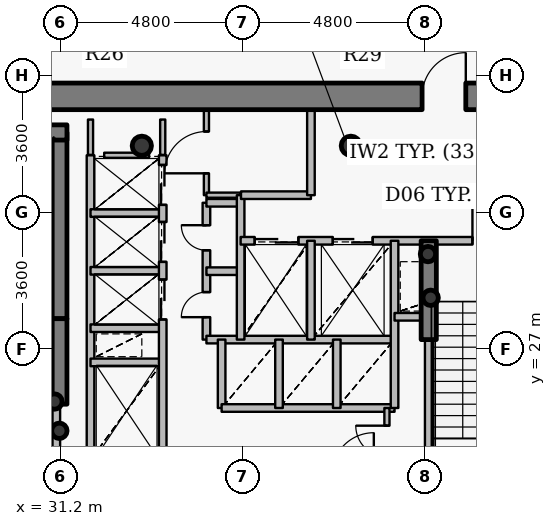
"""IFC4 building model, lengths in metres.
Left out: names, types, materials, properties, quantities, classifications, styles, units other than length and angle.
Written with IfcOpenShell. Run it as: python <this file> out.ifc"""

import sys

from ifc_helpers import new_model, si_unit, direction, frame, frame_2d, origin, origin_2d, place, context, subcontext, project, spatial, rectangle, hollow_circle, extrude, source, transform, mapped, element, fill, save


model = new_model("IFC4")
c1 = context("Model", 3, precision=1e-05, world=origin(), true_north=direction((0.0, 1.0)))
c2 = subcontext(c1, "Body", "Model", "MODEL_VIEW")
j1 = project(units=[si_unit("LENGTHUNIT", "METRE"), si_unit("PLANEANGLEUNIT", "RADIAN")], contexts=[c1])
p1 = place(None, origin())
s1 = spatial("IfcSite", under=j1, at=p1, CompositionType="ELEMENT")
p2 = place(p1, origin())
s2 = spatial("IfcBuilding", under=s1, at=p2, CompositionType="ELEMENT")
p3 = place(p2, frame((0.0, 0.0, 214.05)))
s3 = spatial("IfcBuildingStorey", under=s2, at=p3, CompositionType="ELEMENT", Elevation=214.05)
for number, where, z_axis, x_axis in (
    (1, (38.85, 32.35, 0.0), (0.0, 0.0, 1.0), (1.0, 0.0, 0.0)),
    (2, (33.35, 32.35, 0.0), (0.0, 0.0, 1.0), (1.0, 0.0, 0.0)),
):
    element("IfcColumn", number, at=place(p3, frame(where, z_axis=z_axis, x_axis=x_axis)), inside=s3, PredefinedType="COLUMN", context=c2, shape_type="SweptSolid", body=[
        extrude(hollow_circle(Radius=0.254, WallThickness=0.02, at=origin_2d()), origin(), (0.0, 0.0, 1.0), 3.75),
    ])
p4 = place(p3, frame((31.18, 27.8, 0.0), z_axis=(0.0, 0.0, 1.0), x_axis=(0.0, 1.0, 0.0)))
e3 = element("IfcWall", 3, at=p4, inside=s3, PredefinedType="SHEAR", context=c2, shape_type="SweptSolid", body=[
    extrude(rectangle(XDim=4.9, YDim=0.4, at=frame_2d((2.45, 0.0))), origin(), (0.0, 0.0, 1.0), 3.75),
])
p5 = place(p3, frame((27.28, 32.7, 0.0), z_axis=(0.0, 0.0, 1.0), x_axis=(1.0, 0.0, 0.0)))
e4 = element("IfcWall", 4, at=p5, inside=s3, PredefinedType="SHEAR", context=c2, shape_type="SweptSolid", body=[
    extrude(rectangle(XDim=4.1, YDim=0.4, at=frame_2d((2.05, 0.0))), origin(), (0.0, 0.0, 1.0), 3.75),
])
for number, where, z_axis, x_axis in (
    (5, (31.05, 25.62, 0.0), (0.0, 0.0, 1.0), (1.0, 0.0, 0.0)),
    (6, (31.18, 24.85, 0.0), (0.0, 0.0, 1.0), (1.0, 0.0, 0.0)),
    (7, (40.95, 28.35, 0.0), (0.0, 0.0, 1.0), (1.0, 0.0, 0.0)),
    (8, (40.88, 29.5, 0.0), (0.0, 0.0, 1.0), (1.0, 0.0, 0.0)),
):
    element("IfcColumn", number, at=place(p3, frame(where, z_axis=z_axis, x_axis=x_axis)), inside=s3, PredefinedType="COLUMN", context=c2, shape_type="SweptSolid", body=[
        extrude(hollow_circle(Radius=0.203, WallThickness=0.016, at=origin_2d()), origin(), (0.0, 0.0, 1.0), 3.75),
    ])
p6 = place(p3, frame((27.05, 33.65, 0.0), z_axis=(0.0, 0.0, 1.0), x_axis=(1.0, 0.0, 0.0)))
e9 = element("IfcWall", 9, at=p6, inside=s3, PredefinedType="SHEAR", context=c2, shape_type="SweptSolid", body=[
    extrude(rectangle(XDim=17.9, YDim=0.7, at=frame_2d((8.95, 0.0))), origin(), (0.0, 0.0, 1.0), 3.05),
])
p7 = place(p6, frame((13.675, 0.0, 0.0)))
e10 = element("IfcOpeningElement", 10, at=p7, cuts=e9, PredefinedType="OPENING", context=c2, shape_type="SweptSolid", body=[
    extrude(rectangle(XDim=1.15, YDim=2.15, at=origin_2d()), frame((0.575, 0.36, 1.075), z_axis=(0.0, -1.0, 0.0), x_axis=(1.0, 0.0, 0.0)), (0.0, 0.0, 1.0), 0.72),
])
p8 = place(p3, frame((31.18, 25.55, 0.0), z_axis=(0.0, 0.0, 1.0), x_axis=(0.0, 1.0, 0.0)))
e11 = element("IfcWall", 11, at=p8, inside=s3, PredefinedType="SHEAR", context=c2, shape_type="SweptSolid", body=[
    extrude(rectangle(XDim=2.25, YDim=0.4, at=frame_2d((1.125, 0.0))), origin(), (0.0, 0.0, 1.0), 3.1),
])
p9 = place(p3, frame((40.9, 27.25, 0.0), z_axis=(0.0, 0.0, 1.0), x_axis=(0.0, 1.0, 0.0)))
e12 = element("IfcWall", 12, at=p9, inside=s3, PredefinedType="SHEAR", context=c2, shape_type="SweptSolid", body=[
    extrude(rectangle(XDim=2.6, YDim=0.4, at=frame_2d((1.3, 0.0))), origin(), (0.0, 0.0, 1.0), 3.1),
])
p10 = place(p3, frame((31.1, 24.1, 0.0), z_axis=(0.0, 0.0, 1.0), x_axis=(0.0, 1.0, 0.0)))
e13 = element("IfcWall", 13, at=p10, inside=s3, PredefinedType="PARTITIONING", context=c2, shape_type="SweptSolid", body=[
    extrude(rectangle(XDim=1.44, YDim=0.2, at=frame_2d((0.72, 0.0))), origin(), (0.0, 0.0, 1.0), 3.5),
])
p11 = place(p3, frame((32.0, 24.1, 0.0), z_axis=(0.0, 0.0, 1.0), x_axis=(0.0, 1.0, 0.0)))
e14 = element("IfcWall", 14, at=p11, inside=s3, PredefinedType="PARTITIONING", context=c2, shape_type="SweptSolid", body=[
    extrude(rectangle(XDim=8.0, YDim=0.2, at=frame_2d((4.0, 0.0))), origin(), (0.0, 0.0, 1.0), 3.5),
])
for number, where, z_axis, x_axis in (
    (15, (32.0, 26.65, 0.0), (0.0, 0.0, 1.0), (1.0, 0.0, 0.0)),
    (16, (32.0, 27.55, 0.0), (0.0, 0.0, 1.0), (1.0, 0.0, 0.0)),
    (17, (32.0, 29.06, 0.0), (0.0, 0.0, 1.0), (1.0, 0.0, 0.0)),
    (18, (32.0, 30.58, 0.0), (0.0, 0.0, 1.0), (1.0, 0.0, 0.0)),
):
    element("IfcWall", number, at=place(p3, frame(where, z_axis=z_axis, x_axis=x_axis)), inside=s3, PredefinedType="PARTITIONING", context=c2, shape_type="SweptSolid", body=[
        extrude(rectangle(XDim=1.9, YDim=0.2, at=frame_2d((0.95, 0.0))), origin(), (0.0, 0.0, 1.0), 3.085),
    ])
p12 = place(p3, frame((33.9, 20.7, 0.0), z_axis=(0.0, 0.0, 1.0), x_axis=(0.0, 1.0, 0.0)))
e19 = element("IfcWall", 19, at=p12, inside=s3, PredefinedType="PARTITIONING", context=c2, shape_type="SweptSolid", body=[
    extrude(rectangle(XDim=11.4, YDim=0.2, at=frame_2d((5.7, 0.0))), origin(), (0.0, 0.0, 1.0), 3.085),
])
p13 = place(p12, frame((7.08, 0.0, 0.0)))
e20 = element("IfcOpeningElement", 20, at=p13, cuts=e19, PredefinedType="OPENING", context=c2, shape_type="SweptSolid", body=[
    extrude(rectangle(XDim=1.05, YDim=2.15, at=origin_2d()), frame((0.525, 0.11, 1.075), z_axis=(0.0, -1.0, 0.0), x_axis=(1.0, 0.0, 0.0)), (0.0, 0.0, 1.0), 0.22),
])
p14 = place(p12, frame((8.595, 0.0, 0.0)))
e21 = element("IfcOpeningElement", 21, at=p14, cuts=e19, PredefinedType="OPENING", context=c2, shape_type="SweptSolid", body=[
    extrude(rectangle(XDim=1.05, YDim=2.15, at=origin_2d()), frame((0.525, 0.11, 1.075), z_axis=(0.0, -1.0, 0.0), x_axis=(1.0, 0.0, 0.0)), (0.0, 0.0, 1.0), 0.22),
])
p15 = place(p12, frame((10.095, 0.0, 0.0)))
e22 = element("IfcOpeningElement", 22, at=p15, cuts=e19, PredefinedType="OPENING", context=c2, shape_type="SweptSolid", body=[
    extrude(rectangle(XDim=1.05, YDim=2.15, at=origin_2d()), frame((0.525, 0.11, 1.075), z_axis=(0.0, -1.0, 0.0), x_axis=(1.0, 0.0, 0.0)), (0.0, 0.0, 1.0), 0.22),
])
p16 = place(p3, frame((35.05, 27.25, 0.0), z_axis=(0.0, 0.0, 1.0), x_axis=(0.0, 1.0, 0.0)))
e23 = element("IfcWall", 23, at=p16, inside=s3, PredefinedType="PARTITIONING", context=c2, shape_type="SweptSolid", body=[
    extrude(rectangle(XDim=3.6, YDim=0.2, at=frame_2d((1.8, 0.0))), origin(), (0.0, 0.0, 1.0), 3.5),
])
p17 = place(p16, frame((0.59, 0.0, 0.0)))
e24 = element("IfcOpeningElement", 24, at=p17, cuts=e23, PredefinedType="OPENING", context=c2, shape_type="SweptSolid", body=[
    extrude(rectangle(XDim=0.66, YDim=2.05, at=origin_2d()), frame((0.33, 0.11, 1.025), z_axis=(0.0, -1.0, 0.0), x_axis=(1.0, 0.0, 0.0)), (0.0, 0.0, 1.0), 0.22),
])
p18 = place(p16, frame((2.35, 0.0, 0.0)))
e25 = element("IfcOpeningElement", 25, at=p18, cuts=e23, PredefinedType="OPENING", context=c2, shape_type="SweptSolid", body=[
    extrude(rectangle(XDim=0.66, YDim=2.05, at=origin_2d()), frame((0.33, 0.11, 1.025), z_axis=(0.0, -1.0, 0.0), x_axis=(1.0, 0.0, 0.0)), (0.0, 0.0, 1.0), 0.22),
])
p19 = place(p3, frame((35.05, 27.25, 0.0), z_axis=(0.0, 0.0, 1.0), x_axis=(1.0, 0.0, 0.0)))
e26 = element("IfcWall", 26, at=p19, inside=s3, PredefinedType="PARTITIONING", context=c2, shape_type="SweptSolid", body=[
    extrude(rectangle(XDim=4.95, YDim=0.2, at=frame_2d((2.475, 0.0))), origin(), (0.0, 0.0, 1.0), 3.085),
])
for number, where, z_axis, x_axis in (
    (27, (35.05, 29.05, 0.0), (0.0, 0.0, 1.0), (1.0, 0.0, 0.0)),
    (28, (35.05, 30.85, 0.0), (0.0, 0.0, 1.0), (1.0, 0.0, 0.0)),
):
    element("IfcWall", number, at=place(p3, frame(where, z_axis=z_axis, x_axis=x_axis)), inside=s3, PredefinedType="PARTITIONING", context=c2, shape_type="SweptSolid", body=[
        extrude(rectangle(XDim=0.9, YDim=0.2, at=frame_2d((0.45, 0.0))), origin(), (0.0, 0.0, 1.0), 3.5),
    ])
p20 = place(p3, frame((35.05, 31.05, 0.0), z_axis=(0.0, 0.0, 1.0), x_axis=(0.0, 1.0, 0.0)))
e29 = element("IfcWall", 29, at=p20, inside=s3, PredefinedType="PARTITIONING", context=c2, shape_type="SweptSolid", body=[
    extrude(rectangle(XDim=2.25, YDim=0.135, at=frame_2d((1.125, 0.0))), origin(), (0.0, 0.0, 1.0), 3.085),
])
p21 = place(p20, frame((0.575, 0.0, 0.0)))
e30 = element("IfcOpeningElement", 30, at=p21, cuts=e29, PredefinedType="OPENING", context=c2, shape_type="SweptSolid", body=[
    extrude(rectangle(XDim=1.1, YDim=2.15, at=origin_2d()), frame((0.55, 0.078, 1.075), z_axis=(0.0, -1.0, 0.0), x_axis=(1.0, 0.0, 0.0)), (0.0, 0.0, 1.0), 0.155),
])
p22 = place(p3, frame((35.05, 31.05, 0.0), z_axis=(0.0, 0.0, 1.0), x_axis=(1.0, 0.0, 0.0)))
e31 = element("IfcWall", 31, at=p22, inside=s3, PredefinedType="PARTITIONING", context=c2, shape_type="SweptSolid", body=[
    extrude(rectangle(XDim=0.9, YDim=0.135, at=frame_2d((0.45, 0.0))), origin(), (0.0, 0.0, 1.0), 3.5),
])
p23 = place(p3, frame((35.45, 25.45, 0.0), z_axis=(0.0, 0.0, 1.0), x_axis=(0.0, 1.0, 0.0)))
e32 = element("IfcWall", 32, at=p23, inside=s3, PredefinedType="PARTITIONING", context=c2, shape_type="SweptSolid", body=[
    extrude(rectangle(XDim=1.8, YDim=0.2, at=frame_2d((0.9, 0.0))), origin(), (0.0, 0.0, 1.0), 3.5),
])
p24 = place(p3, frame((35.45, 25.45, 0.0), z_axis=(0.0, 0.0, 1.0), x_axis=(1.0, 0.0, 0.0)))
e33 = element("IfcWall", 33, at=p24, inside=s3, PredefinedType="PARTITIONING", context=c2, shape_type="SweptSolid", body=[
    extrude(rectangle(XDim=4.55, YDim=0.2, at=frame_2d((2.275, 0.0))), origin(), (0.0, 0.0, 1.0), 3.085),
])
p25 = place(p3, frame((35.95, 27.25, 0.0), z_axis=(0.0, 0.0, 1.0), x_axis=(0.0, 1.0, 0.0)))
e34 = element("IfcWall", 34, at=p25, inside=s3, PredefinedType="PARTITIONING", context=c2, shape_type="SweptSolid", body=[
    extrude(rectangle(XDim=3.8, YDim=0.2, at=frame_2d((1.9, 0.0))), origin(), (0.0, 0.0, 1.0), 3.5),
])
p26 = place(p3, frame((35.95, 29.85, 0.0), z_axis=(0.0, 0.0, 1.0), x_axis=(1.0, 0.0, 0.0)))
e35 = element("IfcWall", 35, at=p26, inside=s3, PredefinedType="PARTITIONING", context=c2, shape_type="SweptSolid", body=[
    extrude(rectangle(XDim=8.49, YDim=0.2, at=frame_2d((4.245, 0.0))), origin(), (0.0, 0.0, 1.0), 3.085),
])
p27 = place(p26, frame((6.1, 0.0, 0.0)))
e36 = element("IfcOpeningElement", 36, at=p27, cuts=e35, PredefinedType="OPENING", context=c2, shape_type="SweptSolid", body=[
    extrude(rectangle(XDim=1.2, YDim=2.15, at=origin_2d()), frame((0.6, 0.11, 1.075), z_axis=(0.0, -1.0, 0.0), x_axis=(1.0, 0.0, 0.0)), (0.0, 0.0, 1.0), 0.22),
])
p28 = place(p26, frame((0.37, 0.0, 0.0)))
e37 = element("IfcOpeningElement", 37, at=p28, cuts=e35, PredefinedType="OPENING", context=c2, shape_type="SweptSolid", body=[
    extrude(rectangle(XDim=1.15, YDim=2.15, at=origin_2d()), frame((0.575, 0.11, 1.075), z_axis=(0.0, -1.0, 0.0), x_axis=(1.0, 0.0, 0.0)), (0.0, 0.0, 1.0), 0.22),
])
p29 = place(p26, frame((2.425, 0.0, 0.0)))
e38 = element("IfcOpeningElement", 38, at=p29, cuts=e35, PredefinedType="OPENING", context=c2, shape_type="SweptSolid", body=[
    extrude(rectangle(XDim=1.05, YDim=2.15, at=origin_2d()), frame((0.525, 0.11, 1.075), z_axis=(0.0, -1.0, 0.0), x_axis=(1.0, 0.0, 0.0)), (0.0, 0.0, 1.0), 0.22),
])
p30 = place(p3, frame((35.96, 31.05, 0.0), z_axis=(0.0, 0.0, 1.0), x_axis=(1.0, 0.0, 0.0)))
e39 = element("IfcWall", 39, at=p30, inside=s3, PredefinedType="PARTITIONING", context=c2, shape_type="SweptSolid", body=[
    extrude(rectangle(XDim=1.84, YDim=0.2, at=frame_2d((0.92, 0.0))), origin(), (0.0, 0.0, 1.0), 3.5),
])
p31 = place(p3, frame((36.96, 25.45, 0.0), z_axis=(0.0, 0.0, 1.0), x_axis=(0.0, 1.0, 0.0)))
e40 = element("IfcWall", 40, at=p31, inside=s3, PredefinedType="PARTITIONING", context=c2, shape_type="SweptSolid", body=[
    extrude(rectangle(XDim=1.8, YDim=0.2, at=frame_2d((0.9, 0.0))), origin(), (0.0, 0.0, 1.0), 3.5),
])
p32 = place(p3, frame((37.8, 27.25, 0.0), z_axis=(0.0, 0.0, 1.0), x_axis=(0.0, 1.0, 0.0)))
e41 = element("IfcWall", 41, at=p32, inside=s3, PredefinedType="PARTITIONING", context=c2, shape_type="SweptSolid", body=[
    extrude(rectangle(XDim=2.6, YDim=0.2, at=frame_2d((1.3, 0.0))), origin(), (0.0, 0.0, 1.0), 3.5),
])
p33 = place(p3, frame((37.8, 31.05, 0.0), z_axis=(0.0, 0.0, 1.0), x_axis=(0.0, 1.0, 0.0)))
e42 = element("IfcWall", 42, at=p33, inside=s3, PredefinedType="PARTITIONING", context=c2, shape_type="SweptSolid", body=[
    extrude(rectangle(XDim=2.25, YDim=0.2, at=frame_2d((1.125, 0.0))), origin(), (0.0, 0.0, 1.0), 3.085),
])
p34 = place(p3, frame((38.48, 25.45, 0.0), z_axis=(0.0, 0.0, 1.0), x_axis=(0.0, 1.0, 0.0)))
e43 = element("IfcWall", 43, at=p34, inside=s3, PredefinedType="PARTITIONING", context=c2, shape_type="SweptSolid", body=[
    extrude(rectangle(XDim=1.8, YDim=0.2, at=frame_2d((0.9, 0.0))), origin(), (0.0, 0.0, 1.0), 3.5),
])
p35 = place(p3, frame((39.8, 23.7, 0.0), z_axis=(0.0, 0.0, 1.0), x_axis=(0.0, 1.0, 0.0)))
e44 = element("IfcWall", 44, at=p35, inside=s3, PredefinedType="PARTITIONING", context=c2, shape_type="SweptSolid", body=[
    extrude(rectangle(XDim=1.75, YDim=0.135, at=frame_2d((0.875, 0.0))), origin(), (0.0, 0.0, 1.0), 3.5),
])
p36 = place(p35, frame((0.465, 0.0, 0.0)))
e45 = element("IfcOpeningElement", 45, at=p36, cuts=e44, PredefinedType="OPENING", context=c2, shape_type="SweptSolid", body=[
    extrude(rectangle(XDim=0.82, YDim=2.1, at=origin_2d()), frame((0.41, 0.078, 1.05), z_axis=(0.0, -1.0, 0.0), x_axis=(1.0, 0.0, 0.0)), (0.0, 0.0, 1.0), 0.155),
])
p37 = place(p3, frame((40.0, 25.45, 0.0), z_axis=(0.0, 0.0, 1.0), x_axis=(0.0, 1.0, 0.0)))
e46 = element("IfcWall", 46, at=p37, inside=s3, PredefinedType="PARTITIONING", context=c2, shape_type="SweptSolid", body=[
    extrude(rectangle(XDim=4.4, YDim=0.2, at=frame_2d((2.2, 0.0))), origin(), (0.0, 0.0, 1.0), 3.5),
])
p38 = place(p3, frame((40.0, 27.85, 0.0), z_axis=(0.0, 0.0, 1.0), x_axis=(1.0, 0.0, 0.0)))
e47 = element("IfcWall", 47, at=p38, inside=s3, PredefinedType="PARTITIONING", context=c2, shape_type="SweptSolid", body=[
    extrude(rectangle(XDim=0.9, YDim=0.2, at=frame_2d((0.45, 0.0))), origin(), (0.0, 0.0, 1.0), 3.5),
])
p39 = place(p3, frame((40.9, 21.33, 0.0), z_axis=(0.0, 0.0, 1.0), x_axis=(0.0, 1.0, 0.0)))
e48 = element("IfcWall", 48, at=p39, inside=s3, PredefinedType="PARTITIONING", context=c2, shape_type="SweptSolid", body=[
    extrude(rectangle(XDim=5.91, YDim=0.2, at=frame_2d((2.955, 0.0))), origin(), (0.0, 0.0, 1.0), 3.035),
])
p40 = place(p3, frame((32.36, 32.1, 0.0), z_axis=(0.0, 0.0, 1.0), x_axis=(1.0, 0.0, 0.0)))
e49 = element("IfcWall", 49, at=p40, inside=s3, PredefinedType="PARTITIONING", context=c2, shape_type="SweptSolid", body=[
    extrude(rectangle(XDim=1.18, YDim=0.135, at=frame_2d((0.59, 0.0))), origin(), (0.0, 0.0, 1.0), 3.085),
])
p41 = place(p3, frame((32.0, 33.04, 0.0), z_axis=(0.0, 0.0, 1.0), x_axis=(0.0, -1.0, 0.0)))
e50 = element("IfcWall", 50, at=p41, inside=s3, PredefinedType="PARTITIONING", context=c2, shape_type="SweptSolid", body=[
    extrude(rectangle(XDim=0.93, YDim=0.135, at=frame_2d((0.465, 0.0))), origin(), (0.0, 0.0, 1.0), 3.035),
])
p42 = place(p3, frame((33.9, 32.11, 0.0), z_axis=(0.0, 0.0, 1.0), x_axis=(0.0, 1.0, 0.0)))
e51 = element("IfcWall", 51, at=p42, inside=s3, PredefinedType="PARTITIONING", context=c2, shape_type="SweptSolid", body=[
    extrude(rectangle(XDim=0.93, YDim=0.135, at=frame_2d((0.465, 0.0))), origin(), (0.0, 0.0, 1.0), 3.085),
])
m1 = source(origin(), c2, "Body", "SweptSolid", [
    extrude(rectangle(XDim=1.15, YDim=2.15, at=origin_2d()), frame((0.575, 0.025, 1.075), z_axis=(0.0, -1.0, 0.0), x_axis=(1.0, 0.0, 0.0)), (0.0, 0.0, 1.0), 0.05),
])
p43 = place(p7, origin())
e52 = element("IfcDoor", 52, at=p43, inside=s3, OperationType="SINGLE_SWING_RIGHT", PredefinedType="DOOR", context=c2, shape_type="MappedRepresentation", body=[
    mapped(m1, transform((0.0, 0.0, 0.0), x_axis=(1.0, 0.0, 0.0), y_axis=(0.0, 1.0, 0.0), z_axis=(0.0, 0.0, 1.0), scale=1.0)),
])
fill(e10, e52)
m2 = source(origin(), c2, "Body", "SweptSolid", [
    extrude(rectangle(XDim=1.2, YDim=2.15, at=origin_2d()), frame((0.6, 0.025, 1.075), z_axis=(0.0, -1.0, 0.0), x_axis=(1.0, 0.0, 0.0)), (0.0, 0.0, 1.0), 0.05),
])
p44 = place(p27, origin())
e53 = element("IfcDoor", 53, at=p44, inside=s3, OperationType="SINGLE_SWING_LEFT", PredefinedType="DOOR", context=c2, shape_type="MappedRepresentation", body=[
    mapped(m2, transform((0.0, 0.0, 0.0), x_axis=(1.0, 0.0, 0.0), y_axis=(0.0, 1.0, 0.0), z_axis=(0.0, 0.0, 1.0), scale=1.0)),
])
fill(e36, e53)
m3 = source(origin(), c2, "Body", "SweptSolid", [
    extrude(rectangle(XDim=1.15, YDim=2.15, at=origin_2d()), frame((0.575, 0.025, 1.075), z_axis=(0.0, -1.0, 0.0), x_axis=(1.0, 0.0, 0.0)), (0.0, 0.0, 1.0), 0.05),
])
p45 = place(p28, origin())
e54 = element("IfcDoor", 54, at=p45, inside=s3, OperationType="DOUBLE_DOOR_SLIDING", PredefinedType="USERDEFINED", context=c2, shape_type="MappedRepresentation", body=[
    mapped(m3, transform((0.0, 0.0, 0.0), x_axis=(1.0, 0.0, 0.0), y_axis=(0.0, 1.0, 0.0), z_axis=(0.0, 0.0, 1.0), scale=1.0)),
])
fill(e37, e54)
m4 = source(origin(), c2, "Body", "SweptSolid", [
    extrude(rectangle(XDim=1.05, YDim=2.15, at=origin_2d()), frame((0.525, 0.025, 1.075), z_axis=(0.0, -1.0, 0.0), x_axis=(1.0, 0.0, 0.0)), (0.0, 0.0, 1.0), 0.05),
])
p46 = place(p29, origin())
e55 = element("IfcDoor", 55, at=p46, inside=s3, OperationType="DOUBLE_DOOR_SLIDING", PredefinedType="USERDEFINED", context=c2, shape_type="MappedRepresentation", body=[
    mapped(m4, transform((0.0, 0.0, 0.0), x_axis=(1.0, 0.0, 0.0), y_axis=(0.0, 1.0, 0.0), z_axis=(0.0, 0.0, 1.0), scale=1.0)),
])
fill(e38, e55)
p47 = place(p13, origin())
e56 = element("IfcDoor", 56, at=p47, inside=s3, OperationType="DOUBLE_DOOR_SLIDING", PredefinedType="USERDEFINED", context=c2, shape_type="MappedRepresentation", body=[
    mapped(m4, transform((0.0, 0.0, 0.0), x_axis=(1.0, 0.0, 0.0), y_axis=(0.0, 1.0, 0.0), z_axis=(0.0, 0.0, 1.0), scale=1.0)),
])
fill(e20, e56)
p48 = place(p14, origin())
e57 = element("IfcDoor", 57, at=p48, inside=s3, OperationType="DOUBLE_DOOR_SLIDING", PredefinedType="USERDEFINED", context=c2, shape_type="MappedRepresentation", body=[
    mapped(m4, transform((0.0, 0.0, 0.0), x_axis=(1.0, 0.0, 0.0), y_axis=(0.0, 1.0, 0.0), z_axis=(0.0, 0.0, 1.0), scale=1.0)),
])
fill(e21, e57)
p49 = place(p15, origin())
e58 = element("IfcDoor", 58, at=p49, inside=s3, OperationType="DOUBLE_DOOR_SLIDING", PredefinedType="USERDEFINED", context=c2, shape_type="MappedRepresentation", body=[
    mapped(m4, transform((0.0, 0.0, 0.0), x_axis=(1.0, 0.0, 0.0), y_axis=(0.0, 1.0, 0.0), z_axis=(0.0, 0.0, 1.0), scale=1.0)),
])
fill(e22, e58)
m5 = source(origin(), c2, "Body", "SweptSolid", [
    extrude(rectangle(XDim=0.66, YDim=2.05, at=origin_2d()), frame((0.33, 0.025, 1.025), z_axis=(0.0, -1.0, 0.0), x_axis=(1.0, 0.0, 0.0)), (0.0, 0.0, 1.0), 0.05),
])
p50 = place(p17, origin())
e59 = element("IfcDoor", 59, at=p50, inside=s3, OperationType="SINGLE_SWING_LEFT", PredefinedType="USERDEFINED", context=c2, shape_type="MappedRepresentation", body=[
    mapped(m5, transform((0.0, 0.0, 0.0), x_axis=(1.0, 0.0, 0.0), y_axis=(0.0, 1.0, 0.0), z_axis=(0.0, 0.0, 1.0), scale=1.0)),
])
fill(e24, e59)
p51 = place(p18, origin())
e60 = element("IfcDoor", 60, at=p51, inside=s3, OperationType="SINGLE_SWING_RIGHT", PredefinedType="USERDEFINED", context=c2, shape_type="MappedRepresentation", body=[
    mapped(m5, transform((0.0, 0.0, 0.0), x_axis=(1.0, 0.0, 0.0), y_axis=(0.0, 1.0, 0.0), z_axis=(0.0, 0.0, 1.0), scale=1.0)),
])
fill(e25, e60)
m6 = source(origin(), c2, "Body", "SweptSolid", [
    extrude(rectangle(XDim=1.1, YDim=2.15, at=origin_2d()), frame((0.55, 0.025, 1.075), z_axis=(0.0, -1.0, 0.0), x_axis=(1.0, 0.0, 0.0)), (0.0, 0.0, 1.0), 0.05),
])
p52 = place(p21, origin())
e61 = element("IfcDoor", 61, at=p52, inside=s3, OperationType="SINGLE_SWING_LEFT", PredefinedType="DOOR", context=c2, shape_type="MappedRepresentation", body=[
    mapped(m6, transform((0.0, 0.0, 0.0), x_axis=(1.0, 0.0, 0.0), y_axis=(0.0, 1.0, 0.0), z_axis=(0.0, 0.0, 1.0), scale=1.0)),
])
fill(e30, e61)
m7 = source(origin(), c2, "Body", "SweptSolid", [
    extrude(rectangle(XDim=0.82, YDim=2.1, at=origin_2d()), frame((0.41, 0.025, 1.05), z_axis=(0.0, -1.0, 0.0), x_axis=(1.0, 0.0, 0.0)), (0.0, 0.0, 1.0), 0.05),
])
p53 = place(p36, origin())
e62 = element("IfcDoor", 62, at=p53, inside=s3, OperationType="SINGLE_SWING_RIGHT", PredefinedType="DOOR", context=c2, shape_type="MappedRepresentation", body=[
    mapped(m7, transform((0.0, 0.0, 0.0), x_axis=(1.0, 0.0, 0.0), y_axis=(0.0, 1.0, 0.0), z_axis=(0.0, 0.0, 1.0), scale=1.0)),
])
fill(e45, e62)
save(model, sys.argv[1])
